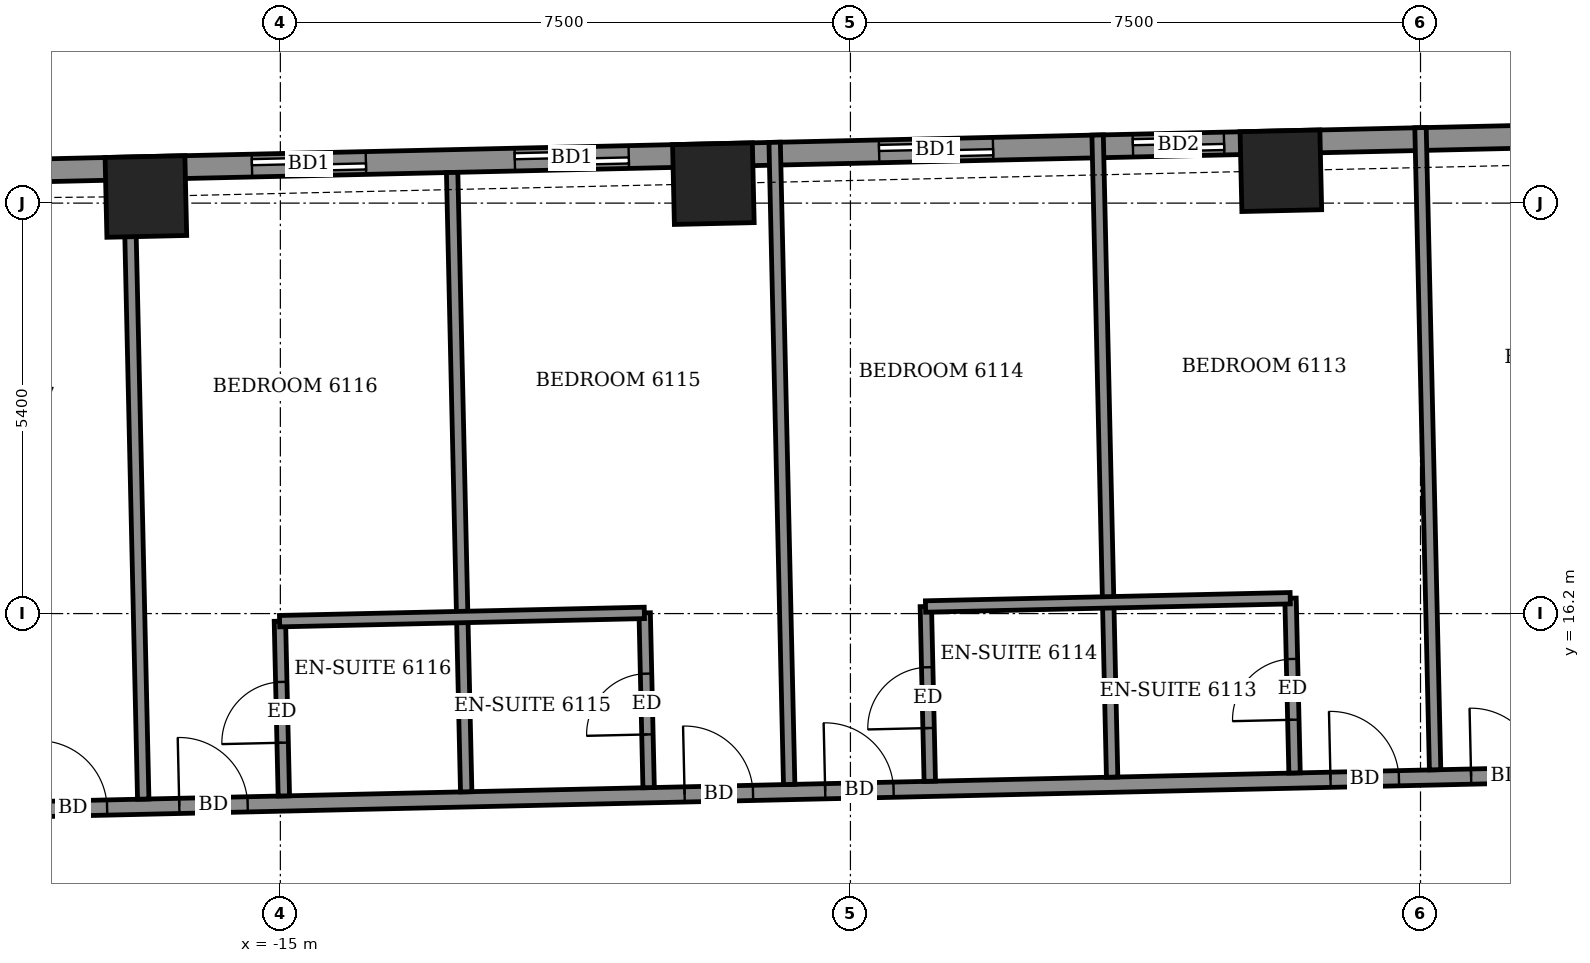
"""IFC4 building model, lengths in metres.
Left out: names, types, materials, properties, quantities, classifications, styles, units other than length and angle.
Written with IfcOpenShell. Run it as: python <this file> out.ifc"""

import sys

from ifc_helpers import new_model, si_unit, direction, frame, frame_2d, origin, origin_2d, place, context, subcontext, project, spatial, rectangle, extrude, element, fill, save


model = new_model("IFC4")
c1 = context("Model", 3, precision=1e-05, world=origin(), true_north=direction((0.0, 1.0)))
c2 = subcontext(c1, "Body", "Model", "MODEL_VIEW")
j1 = project(units=[si_unit("LENGTHUNIT", "METRE"), si_unit("PLANEANGLEUNIT", "RADIAN")], contexts=[c1])
p1 = place(None, origin())
s1 = spatial("IfcSite", under=j1, at=p1, CompositionType="ELEMENT")
p2 = place(p1, origin())
s2 = spatial("IfcBuilding", under=s1, at=p2, CompositionType="ELEMENT")
p3 = place(p2, frame((0.0, 0.0, 241.9)))
s3 = spatial("IfcBuildingStorey", under=s2, at=p3, CompositionType="ELEMENT", Elevation=241.9)
for number, where, z_axis, x_axis in (
    (1, (-1.837, 22.026, -0.55), (0.0, 0.0, 1.0), (-1.0, -0.023, 0.0)),
    (2, (-9.303, 21.856, -0.55), (0.0, 0.0, 1.0), (-1.0, -0.023, 0.0)),
    (3, (-16.769, 21.687, -0.55), (0.0, 0.0, 1.0), (-1.0, -0.023, 0.0)),
):
    element("IfcColumn", number, at=place(p3, frame(where, z_axis=z_axis, x_axis=x_axis)), inside=s3, PredefinedType="COLUMN", context=c2, shape_type="SweptSolid", body=[
        extrude(rectangle(XDim=1.05, YDim=1.05, at=origin_2d()), origin(), (0.0, 0.0, 1.0), 3.6),
    ])
p4 = place(p3, frame((20.403, 22.905, 0.0), z_axis=(0.0, 0.0, 1.0), x_axis=(-0.99974298964, -0.022670568288, 0.0)))
e4 = element("IfcWall", 4, at=p4, inside=s3, PredefinedType="SOLIDWALL", context=c2, shape_type="SweptSolid", body=[
    extrude(rectangle(XDim=44.509, YDim=0.3, at=frame_2d((22.254, 0.0))), origin(), (0.0, 0.0, 1.0), 2.5),
])
p5 = place(p4, frame((1.272, 0.0, 0.0)))
e5 = element("IfcOpeningElement", 5, at=p5, cuts=e4, PredefinedType="OPENING", context=c2, shape_type="SweptSolid", body=[
    extrude(rectangle(XDim=1.5, YDim=2.4, at=frame_2d((0.75, 1.2))), frame((0.0, 0.16, 0.0), z_axis=(0.0, -1.0, 0.0), x_axis=(1.0, 0.0, 0.0)), (0.0, 0.0, 1.0), 0.32),
])
p6 = place(p4, frame((4.501, 0.0, 0.0)))
e6 = element("IfcOpeningElement", 6, at=p6, cuts=e4, PredefinedType="OPENING", context=c2, shape_type="SweptSolid", body=[
    extrude(rectangle(XDim=1.5, YDim=2.4, at=frame_2d((0.75, 1.2))), frame((0.0, 0.16, 0.0), z_axis=(0.0, -1.0, 0.0), x_axis=(1.0, 0.0, 0.0)), (0.0, 0.0, 1.0), 0.32),
])
p7 = place(p4, frame((9.058, 0.0, 0.0)))
e7 = element("IfcOpeningElement", 7, at=p7, cuts=e4, PredefinedType="OPENING", context=c2, shape_type="SweptSolid", body=[
    extrude(rectangle(XDim=1.5, YDim=2.4, at=frame_2d((0.75, 1.2))), frame((0.0, 0.16, 0.0), z_axis=(0.0, -1.0, 0.0), x_axis=(1.0, 0.0, 0.0)), (0.0, 0.0, 1.0), 0.32),
])
p8 = place(p4, frame((12.46, 0.0, 0.0)))
e8 = element("IfcOpeningElement", 8, at=p8, cuts=e4, PredefinedType="OPENING", context=c2, shape_type="SweptSolid", body=[
    extrude(rectangle(XDim=1.5, YDim=2.4, at=frame_2d((0.75, 1.2))), frame((0.0, 0.16, 0.0), z_axis=(0.0, -1.0, 0.0), x_axis=(1.0, 0.0, 0.0)), (0.0, 0.0, 1.0), 0.32),
])
p9 = place(p4, frame((17.533, 0.0, 0.0)))
e9 = element("IfcOpeningElement", 9, at=p9, cuts=e4, PredefinedType="OPENING", context=c2, shape_type="SweptSolid", body=[
    extrude(rectangle(XDim=1.5, YDim=2.4, at=frame_2d((0.75, 1.2))), frame((0.0, 0.16, 0.0), z_axis=(0.0, -1.0, 0.0), x_axis=(1.0, 0.0, 0.0)), (0.0, 0.0, 1.0), 0.32),
])
p10 = place(p4, frame((22.993, 0.0, 0.0)))
e10 = element("IfcOpeningElement", 10, at=p10, cuts=e4, PredefinedType="OPENING", context=c2, shape_type="SweptSolid", body=[
    extrude(rectangle(XDim=1.2, YDim=2.4, at=frame_2d((0.6, 1.2))), frame((0.0, 0.16, 0.0), z_axis=(0.0, -1.0, 0.0), x_axis=(1.0, 0.0, 0.0)), (0.0, 0.0, 1.0), 0.32),
])
p11 = place(p4, frame((26.033, 0.0, 0.0)))
e11 = element("IfcOpeningElement", 11, at=p11, cuts=e4, PredefinedType="OPENING", context=c2, shape_type="SweptSolid", body=[
    extrude(rectangle(XDim=1.5, YDim=2.4, at=frame_2d((0.75, 1.2))), frame((0.0, 0.16, 0.0), z_axis=(0.0, -1.0, 0.0), x_axis=(1.0, 0.0, 0.0)), (0.0, 0.0, 1.0), 0.32),
])
p12 = place(p4, frame((30.827, 0.0, 0.0)))
e12 = element("IfcOpeningElement", 12, at=p12, cuts=e4, PredefinedType="OPENING", context=c2, shape_type="SweptSolid", body=[
    extrude(rectangle(XDim=1.5, YDim=2.4, at=frame_2d((0.75, 1.2))), frame((0.0, 0.16, 0.0), z_axis=(0.0, -1.0, 0.0), x_axis=(1.0, 0.0, 0.0)), (0.0, 0.0, 1.0), 0.32),
])
p13 = place(p4, frame((34.286, 0.0, 0.0)))
e13 = element("IfcOpeningElement", 13, at=p13, cuts=e4, PredefinedType="OPENING", context=c2, shape_type="SweptSolid", body=[
    extrude(rectangle(XDim=1.5, YDim=2.4, at=frame_2d((0.75, 1.2))), frame((0.0, 0.16, 0.0), z_axis=(0.0, -1.0, 0.0), x_axis=(1.0, 0.0, 0.0)), (0.0, 0.0, 1.0), 0.32),
])
p14 = place(p4, frame((38.811, 0.0, 0.0)))
e14 = element("IfcOpeningElement", 14, at=p14, cuts=e4, PredefinedType="OPENING", context=c2, shape_type="SweptSolid", body=[
    extrude(rectangle(XDim=1.5, YDim=2.4, at=frame_2d((0.75, 1.2))), frame((0.0, 0.16, 0.0), z_axis=(0.0, -1.0, 0.0), x_axis=(1.0, 0.0, 0.0)), (0.0, 0.0, 1.0), 0.32),
])
p15 = place(p4, frame((42.148, 0.0, 0.9)))
e15 = element("IfcOpeningElement", 15, at=p15, cuts=e4, PredefinedType="OPENING", context=c2, shape_type="SweptSolid", body=[
    extrude(rectangle(XDim=1.2, YDim=1.5, at=frame_2d((0.6, 0.75))), frame((0.0, 0.16, 0.0), z_axis=(0.0, -1.0, 0.0), x_axis=(1.0, 0.0, 0.0)), (0.0, 0.0, 1.0), 0.32),
])
p16 = place(p3, frame((-27.652, 13.413, 0.0), z_axis=(0.0, 0.0, 1.0), x_axis=(0.999742864992, 0.022676064408, 0.0)))
e16 = element("IfcWall", 16, at=p16, inside=s3, PredefinedType="PARTITIONING", context=c2, shape_type="SweptSolid", body=[
    extrude(rectangle(XDim=50.882, YDim=0.2, at=frame_2d((25.441, 0.0))), origin(), (0.0, 0.0, 1.0), 3.05),
])
p17 = place(p16, frame((47.801, 0.0, 0.0)))
e17 = element("IfcOpeningElement", 17, at=p17, cuts=e16, PredefinedType="OPENING", context=c2, shape_type="SweptSolid", body=[
    extrude(rectangle(XDim=1.0, YDim=2.1, at=frame_2d((0.5, 1.05))), frame((0.0, 0.11, 0.0), z_axis=(0.0, -1.0, 0.0), x_axis=(1.0, 0.0, 0.0)), (0.0, 0.0, 1.0), 0.22),
])
p18 = place(p16, frame((43.425, 0.0, 0.0)))
e18 = element("IfcOpeningElement", 18, at=p18, cuts=e16, PredefinedType="OPENING", context=c2, shape_type="SweptSolid", body=[
    extrude(rectangle(XDim=0.9, YDim=2.1, at=frame_2d((0.45, 1.05))), frame((0.0, 0.11, 0.0), z_axis=(0.0, -1.0, 0.0), x_axis=(1.0, 0.0, 0.0)), (0.0, 0.0, 1.0), 0.22),
])
p19 = place(p16, frame((36.8, 0.0, 0.0)))
e19 = element("IfcOpeningElement", 19, at=p19, cuts=e16, PredefinedType="OPENING", context=c2, shape_type="SweptSolid", body=[
    extrude(rectangle(XDim=0.9, YDim=2.1, at=frame_2d((0.45, 1.05))), frame((0.0, 0.11, 0.0), z_axis=(0.0, -1.0, 0.0), x_axis=(1.0, 0.0, 0.0)), (0.0, 0.0, 1.0), 0.22),
])
p20 = place(p16, frame((34.975, 0.0, 0.0)))
e20 = element("IfcOpeningElement", 20, at=p20, cuts=e16, PredefinedType="OPENING", context=c2, shape_type="SweptSolid", body=[
    extrude(rectangle(XDim=0.9, YDim=2.1, at=frame_2d((0.45, 1.05))), frame((0.0, 0.11, 0.0), z_axis=(0.0, -1.0, 0.0), x_axis=(1.0, 0.0, 0.0)), (0.0, 0.0, 1.0), 0.22),
])
p21 = place(p16, frame((28.325, 0.0, 0.0)))
e21 = element("IfcOpeningElement", 21, at=p21, cuts=e16, PredefinedType="OPENING", context=c2, shape_type="SweptSolid", body=[
    extrude(rectangle(XDim=0.9, YDim=2.1, at=frame_2d((0.45, 1.05))), frame((0.0, 0.11, 0.0), z_axis=(0.0, -1.0, 0.0), x_axis=(1.0, 0.0, 0.0)), (0.0, 0.0, 1.0), 0.22),
])
p22 = place(p16, frame((26.475, 0.0, 0.0)))
e22 = element("IfcOpeningElement", 22, at=p22, cuts=e16, PredefinedType="OPENING", context=c2, shape_type="SweptSolid", body=[
    extrude(rectangle(XDim=0.9, YDim=2.1, at=frame_2d((0.45, 1.05))), frame((0.0, 0.11, 0.0), z_axis=(0.0, -1.0, 0.0), x_axis=(1.0, 0.0, 0.0)), (0.0, 0.0, 1.0), 0.22),
])
p23 = place(p16, frame((19.825, 0.0, 0.0)))
e23 = element("IfcOpeningElement", 23, at=p23, cuts=e16, PredefinedType="OPENING", context=c2, shape_type="SweptSolid", body=[
    extrude(rectangle(XDim=0.9, YDim=2.1, at=frame_2d((0.45, 1.05))), frame((0.0, 0.11, 0.0), z_axis=(0.0, -1.0, 0.0), x_axis=(1.0, 0.0, 0.0)), (0.0, 0.0, 1.0), 0.22),
])
p24 = place(p16, frame((17.975, 0.0, 0.0)))
e24 = element("IfcOpeningElement", 24, at=p24, cuts=e16, PredefinedType="OPENING", context=c2, shape_type="SweptSolid", body=[
    extrude(rectangle(XDim=0.9, YDim=2.1, at=frame_2d((0.45, 1.05))), frame((0.0, 0.11, 0.0), z_axis=(0.0, -1.0, 0.0), x_axis=(1.0, 0.0, 0.0)), (0.0, 0.0, 1.0), 0.22),
])
p25 = place(p16, frame((11.325, 0.0, 0.0)))
e25 = element("IfcOpeningElement", 25, at=p25, cuts=e16, PredefinedType="OPENING", context=c2, shape_type="SweptSolid", body=[
    extrude(rectangle(XDim=0.9, YDim=2.1, at=frame_2d((0.45, 1.05))), frame((0.0, 0.11, 0.0), z_axis=(0.0, -1.0, 0.0), x_axis=(1.0, 0.0, 0.0)), (0.0, 0.0, 1.0), 0.22),
])
p26 = place(p16, frame((9.475, 0.0, 0.0)))
e26 = element("IfcOpeningElement", 26, at=p26, cuts=e16, PredefinedType="OPENING", context=c2, shape_type="SweptSolid", body=[
    extrude(rectangle(XDim=0.9, YDim=2.1, at=frame_2d((0.45, 1.05))), frame((0.0, 0.11, 0.0), z_axis=(0.0, -1.0, 0.0), x_axis=(1.0, 0.0, 0.0)), (0.0, 0.0, 1.0), 0.22),
])
p27 = place(p16, frame((2.772, 0.0, 0.0)))
e27 = element("IfcOpeningElement", 27, at=p27, cuts=e16, PredefinedType="OPENING", context=c2, shape_type="SweptSolid", body=[
    extrude(rectangle(XDim=1.0, YDim=2.1, at=frame_2d((0.5, 1.05))), frame((0.0, 0.11, 0.0), z_axis=(0.0, -1.0, 0.0), x_axis=(1.0, 0.0, 0.0)), (0.0, 0.0, 1.0), 0.22),
])
p28 = place(p3, frame((-16.804, 13.759, 0.0), z_axis=(0.0, 0.0, 1.0), x_axis=(-0.022586673637, 0.999744888546, 0.0)))
e28 = element("IfcWall", 28, at=p28, inside=s3, PredefinedType="PARTITIONING", context=c2, shape_type="SweptSolid", body=[
    extrude(rectangle(XDim=8.15, YDim=0.15, at=frame_2d((4.075, 0.0))), origin(), (0.0, 0.0, 1.0), 3.05),
])
p29 = place(p3, frame((-14.954, 13.801, 0.0), z_axis=(0.0, 0.0, 1.0), x_axis=(-0.022612884682, 0.999744296031, 0.0)))
e29 = element("IfcWall", 29, at=p29, inside=s3, PredefinedType="PARTITIONING", context=c2, shape_type="SweptSolid", body=[
    extrude(rectangle(XDim=2.3, YDim=0.15, at=frame_2d((1.15, 0.0))), origin(), (0.0, 0.0, 1.0), 3.05),
])
p30 = place(p29, frame((0.7, 0.0, 0.0)))
e30 = element("IfcOpeningElement", 30, at=p30, cuts=e29, PredefinedType="OPENING", context=c2, shape_type="SweptSolid", body=[
    extrude(rectangle(XDim=0.8, YDim=2.1, at=frame_2d((0.4, 1.05))), frame((0.0, 0.085, 0.0), z_axis=(0.0, -1.0, 0.0), x_axis=(1.0, 0.0, 0.0)), (0.0, 0.0, 1.0), 0.17),
])
p31 = place(p3, frame((-12.555, 13.855, 0.0), z_axis=(0.0, 0.0, 1.0), x_axis=(-0.022706435224, 0.999742175663, 0.0)))
e31 = element("IfcWall", 31, at=p31, inside=s3, PredefinedType="PARTITIONING", context=c2, shape_type="SweptSolid", body=[
    extrude(rectangle(XDim=8.15, YDim=0.15, at=frame_2d((4.075, 0.0))), origin(), (0.0, 0.0, 1.0), 2.5),
])
p32 = place(p3, frame((-10.155, 13.91, 0.0), z_axis=(0.0, 0.0, 1.0), x_axis=(-0.022612884682, 0.999744296031, 0.0)))
e32 = element("IfcWall", 32, at=p32, inside=s3, PredefinedType="PARTITIONING", context=c2, shape_type="SweptSolid", body=[
    extrude(rectangle(XDim=2.3, YDim=0.15, at=frame_2d((1.15, 0.0))), origin(), (0.0, 0.0, 1.0), 3.05),
])
p33 = place(p32, frame((0.7, 0.0, 0.0)))
e33 = element("IfcOpeningElement", 33, at=p33, cuts=e32, PredefinedType="OPENING", context=c2, shape_type="SweptSolid", body=[
    extrude(rectangle(XDim=0.8, YDim=2.1, at=frame_2d((0.4, 1.05))), frame((0.0, 0.085, 0.0), z_axis=(0.0, -1.0, 0.0), x_axis=(1.0, 0.0, 0.0)), (0.0, 0.0, 1.0), 0.17),
])
p34 = place(p3, frame((-8.306, 13.952, 0.0), z_axis=(0.0, 0.0, 1.0), x_axis=(-0.022622304913, 0.999744082913, 0.0)))
e34 = element("IfcWall", 34, at=p34, inside=s3, PredefinedType="PARTITIONING", context=c2, shape_type="SweptSolid", body=[
    extrude(rectangle(XDim=8.45, YDim=0.15, at=frame_2d((4.225, 0.0))), origin(), (0.0, 0.0, 1.0), 2.5),
])
p35 = place(p3, frame((-6.456, 13.994, 0.0), z_axis=(0.0, 0.0, 1.0), x_axis=(-0.022612884682, 0.999744296031, 0.0)))
e35 = element("IfcWall", 35, at=p35, inside=s3, PredefinedType="PARTITIONING", context=c2, shape_type="SweptSolid", body=[
    extrude(rectangle(XDim=2.3, YDim=0.15, at=frame_2d((1.15, 0.0))), origin(), (0.0, 0.0, 1.0), 3.05),
])
p36 = place(p35, frame((0.7, 0.0, 0.0)))
e36 = element("IfcOpeningElement", 36, at=p36, cuts=e35, PredefinedType="OPENING", context=c2, shape_type="SweptSolid", body=[
    extrude(rectangle(XDim=0.8, YDim=2.1, at=frame_2d((0.4, 1.05))), frame((0.0, 0.085, 0.0), z_axis=(0.0, -1.0, 0.0), x_axis=(1.0, 0.0, 0.0)), (0.0, 0.0, 1.0), 0.17),
])
p37 = place(p3, frame((-4.057, 14.048, 0.0), z_axis=(0.0, 0.0, 1.0), x_axis=(-0.022622304913, 0.999744082913, 0.0)))
e37 = element("IfcWall", 37, at=p37, inside=s3, PredefinedType="PARTITIONING", context=c2, shape_type="SweptSolid", body=[
    extrude(rectangle(XDim=8.45, YDim=0.15, at=frame_2d((4.225, 0.0))), origin(), (0.0, 0.0, 1.0), 2.5),
])
p38 = place(p3, frame((-1.657, 14.103, 0.0), z_axis=(0.0, 0.0, 1.0), x_axis=(-0.023037316498, 0.999734605807, 0.0)))
e38 = element("IfcWall", 38, at=p38, inside=s3, PredefinedType="PARTITIONING", context=c2, shape_type="SweptSolid", body=[
    extrude(rectangle(XDim=2.3, YDim=0.15, at=frame_2d((1.15, 0.0))), origin(), (0.0, 0.0, 1.0), 3.05),
])
p39 = place(p38, frame((0.7, 0.0, 0.0)))
e39 = element("IfcOpeningElement", 39, at=p39, cuts=e38, PredefinedType="OPENING", context=c2, shape_type="SweptSolid", body=[
    extrude(rectangle(XDim=0.8, YDim=2.1, at=frame_2d((0.4, 1.05))), frame((0.0, 0.085, 0.0), z_axis=(0.0, -1.0, 0.0), x_axis=(1.0, 0.0, 0.0)), (0.0, 0.0, 1.0), 0.17),
])
p40 = place(p3, frame((0.192, 14.145, 0.0), z_axis=(0.0, 0.0, 1.0), x_axis=(-0.022708935798, 0.999742118866, 0.0)))
e40 = element("IfcWall", 40, at=p40, inside=s3, PredefinedType="PARTITIONING", context=c2, shape_type="SweptSolid", body=[
    extrude(rectangle(XDim=8.45, YDim=0.15, at=frame_2d((4.225, 0.0))), origin(), (0.0, 0.0, 1.0), 2.5),
])
p41 = place(p3, frame((-15.01, 16.1, 0.0), z_axis=(0.0, 0.0, 1.0), x_axis=(0.999742701292, 0.022683280499, 0.0)))
e41 = element("IfcWall", 41, at=p41, inside=s3, PredefinedType="PARTITIONING", context=c2, shape_type="SweptSolid", body=[
    extrude(rectangle(XDim=4.8, YDim=0.15, at=frame_2d((2.4, 0.0))), origin(), (0.0, 0.0, 1.0), 3.05),
])
p42 = place(p3, frame((-6.512, 16.293, 0.0), z_axis=(0.0, 0.0, 1.0), x_axis=(0.999741415159, 0.022739894798, 0.0)))
e42 = element("IfcWall", 42, at=p42, inside=s3, PredefinedType="PARTITIONING", context=c2, shape_type="SweptSolid", body=[
    extrude(rectangle(XDim=4.799, YDim=0.15, at=frame_2d((2.399, 0.0))), origin(), (0.0, 0.0, 1.0), 3.05),
])
p43 = place(p10, origin())
e43 = element("IfcDoor", 43, at=p43, inside=s3, OperationType="SLIDING_TO_LEFT", PredefinedType="DOOR", context=c2, shape_type="SweptSolid", body=[
    extrude(rectangle(XDim=1.2, YDim=2.4, at=frame_2d((0.6, 1.2))), frame((0.0, 0.025, 0.0), z_axis=(0.0, -1.0, 0.0), x_axis=(1.0, 0.0, 0.0)), (0.0, 0.0, 1.0), 0.05),
])
fill(e10, e43)
p44 = place(p11, origin())
e44 = element("IfcDoor", 44, at=p44, inside=s3, OperationType="SLIDING_TO_LEFT", PredefinedType="DOOR", context=c2, shape_type="SweptSolid", body=[
    extrude(rectangle(XDim=1.5, YDim=2.4, at=frame_2d((0.75, 1.2))), frame((0.0, 0.025, 0.0), z_axis=(0.0, -1.0, 0.0), x_axis=(1.0, 0.0, 0.0)), (0.0, 0.0, 1.0), 0.05),
])
fill(e11, e44)
p45 = place(p12, origin())
e45 = element("IfcDoor", 45, at=p45, inside=s3, OperationType="SLIDING_TO_LEFT", PredefinedType="DOOR", context=c2, shape_type="SweptSolid", body=[
    extrude(rectangle(XDim=1.5, YDim=2.4, at=frame_2d((0.75, 1.2))), frame((0.0, 0.025, 0.0), z_axis=(0.0, -1.0, 0.0), x_axis=(1.0, 0.0, 0.0)), (0.0, 0.0, 1.0), 0.05),
])
fill(e12, e45)
p46 = place(p13, origin())
e46 = element("IfcDoor", 46, at=p46, inside=s3, OperationType="SLIDING_TO_LEFT", PredefinedType="DOOR", context=c2, shape_type="SweptSolid", body=[
    extrude(rectangle(XDim=1.5, YDim=2.4, at=frame_2d((0.75, 1.2))), frame((0.0, 0.025, 0.0), z_axis=(0.0, -1.0, 0.0), x_axis=(1.0, 0.0, 0.0)), (0.0, 0.0, 1.0), 0.05),
])
fill(e13, e46)
p47 = place(p21, origin())
e47 = element("IfcDoor", 47, at=p47, inside=s3, OperationType="SINGLE_SWING_RIGHT", PredefinedType="DOOR", context=c2, shape_type="SweptSolid", body=[
    extrude(rectangle(XDim=0.9, YDim=2.1, at=frame_2d((0.45, 1.05))), frame((0.0, 0.025, 0.0), z_axis=(0.0, -1.0, 0.0), x_axis=(1.0, 0.0, 0.0)), (0.0, 0.0, 1.0), 0.05),
])
fill(e21, e47)
p48 = place(p22, origin())
e48 = element("IfcDoor", 48, at=p48, inside=s3, OperationType="SINGLE_SWING_LEFT", PredefinedType="DOOR", context=c2, shape_type="SweptSolid", body=[
    extrude(rectangle(XDim=0.9, YDim=2.1, at=frame_2d((0.45, 1.05))), frame((0.0, 0.025, 0.0), z_axis=(0.0, -1.0, 0.0), x_axis=(1.0, 0.0, 0.0)), (0.0, 0.0, 1.0), 0.05),
])
fill(e22, e48)
p49 = place(p39, origin())
e49 = element("IfcDoor", 49, at=p49, inside=s3, OperationType="SINGLE_SWING_LEFT", PredefinedType="DOOR", context=c2, shape_type="SweptSolid", body=[
    extrude(rectangle(XDim=0.8, YDim=2.1, at=frame_2d((0.4, 1.05))), frame((0.0, 0.025, 0.0), z_axis=(0.0, -1.0, 0.0), x_axis=(1.0, 0.0, 0.0)), (0.0, 0.0, 1.0), 0.05),
])
fill(e39, e49)
p50 = place(p23, origin())
e50 = element("IfcDoor", 50, at=p50, inside=s3, OperationType="SINGLE_SWING_RIGHT", PredefinedType="DOOR", context=c2, shape_type="SweptSolid", body=[
    extrude(rectangle(XDim=0.9, YDim=2.1, at=frame_2d((0.45, 1.05))), frame((0.0, 0.025, 0.0), z_axis=(0.0, -1.0, 0.0), x_axis=(1.0, 0.0, 0.0)), (0.0, 0.0, 1.0), 0.05),
])
fill(e23, e50)
p51 = place(p36, origin())
e51 = element("IfcDoor", 51, at=p51, inside=s3, OperationType="SINGLE_SWING_RIGHT", PredefinedType="DOOR", context=c2, shape_type="SweptSolid", body=[
    extrude(rectangle(XDim=0.8, YDim=2.1, at=frame_2d((0.4, 1.05))), frame((0.0, 0.025, 0.0), z_axis=(0.0, -1.0, 0.0), x_axis=(1.0, 0.0, 0.0)), (0.0, 0.0, 1.0), 0.05),
])
fill(e36, e51)
p52 = place(p24, origin())
e52 = element("IfcDoor", 52, at=p52, inside=s3, OperationType="SINGLE_SWING_LEFT", PredefinedType="DOOR", context=c2, shape_type="SweptSolid", body=[
    extrude(rectangle(XDim=0.9, YDim=2.1, at=frame_2d((0.45, 1.05))), frame((0.0, 0.025, 0.0), z_axis=(0.0, -1.0, 0.0), x_axis=(1.0, 0.0, 0.0)), (0.0, 0.0, 1.0), 0.05),
])
fill(e24, e52)
p53 = place(p33, origin())
e53 = element("IfcDoor", 53, at=p53, inside=s3, OperationType="SINGLE_SWING_LEFT", PredefinedType="DOOR", context=c2, shape_type="SweptSolid", body=[
    extrude(rectangle(XDim=0.8, YDim=2.1, at=frame_2d((0.4, 1.05))), frame((0.0, 0.025, 0.0), z_axis=(0.0, -1.0, 0.0), x_axis=(1.0, 0.0, 0.0)), (0.0, 0.0, 1.0), 0.05),
])
fill(e33, e53)
p54 = place(p25, origin())
e54 = element("IfcDoor", 54, at=p54, inside=s3, OperationType="SINGLE_SWING_RIGHT", PredefinedType="DOOR", context=c2, shape_type="SweptSolid", body=[
    extrude(rectangle(XDim=0.9, YDim=2.1, at=frame_2d((0.45, 1.05))), frame((0.0, 0.025, 0.0), z_axis=(0.0, -1.0, 0.0), x_axis=(1.0, 0.0, 0.0)), (0.0, 0.0, 1.0), 0.05),
])
fill(e25, e54)
p55 = place(p30, origin())
e55 = element("IfcDoor", 55, at=p55, inside=s3, OperationType="SINGLE_SWING_RIGHT", PredefinedType="DOOR", context=c2, shape_type="SweptSolid", body=[
    extrude(rectangle(XDim=0.8, YDim=2.1, at=frame_2d((0.4, 1.05))), frame((0.0, 0.025, 0.0), z_axis=(0.0, -1.0, 0.0), x_axis=(1.0, 0.0, 0.0)), (0.0, 0.0, 1.0), 0.05),
])
fill(e30, e55)
p56 = place(p26, origin())
e56 = element("IfcDoor", 56, at=p56, inside=s3, OperationType="SINGLE_SWING_LEFT", PredefinedType="DOOR", context=c2, shape_type="SweptSolid", body=[
    extrude(rectangle(XDim=0.9, YDim=2.1, at=frame_2d((0.45, 1.05))), frame((0.0, 0.025, 0.0), z_axis=(0.0, -1.0, 0.0), x_axis=(1.0, 0.0, 0.0)), (0.0, 0.0, 1.0), 0.05),
])
fill(e26, e56)
save(model, sys.argv[1])
